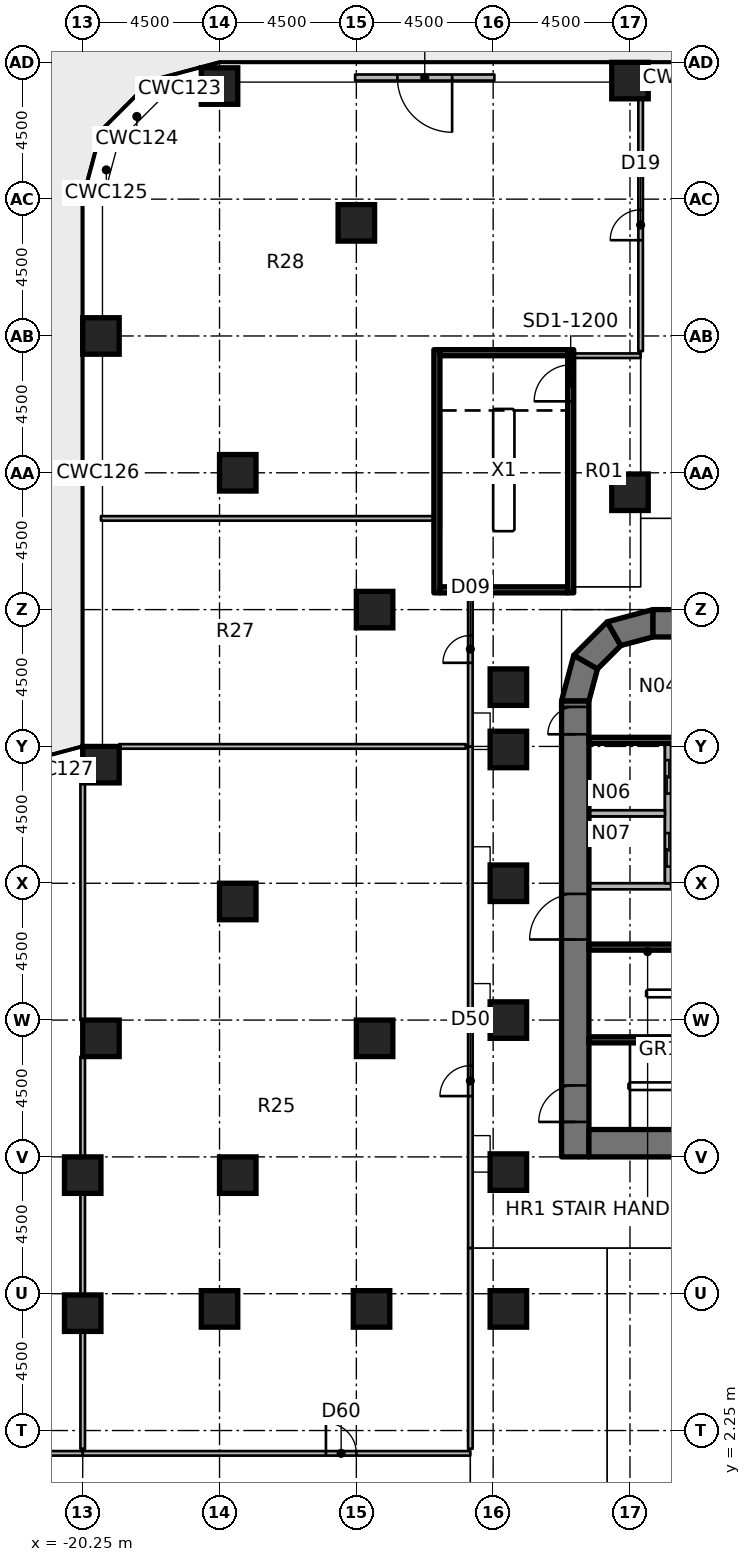
"""IFC4 building model, lengths in metres.
Left out: names, types, materials, properties, quantities, classifications, styles, units other than length and angle.
Written with IfcOpenShell. Run it as: python <this file> out.ifc"""

import sys

from ifc_helpers import new_model, si_unit, direction, frame, frame_2d, origin, origin_2d, place, context, subcontext, project, spatial, polyline, rectangle, outline, extrude, element, fill, save


model = new_model("IFC4")
c1 = context("Model", 3, precision=1e-05, world=origin(), true_north=direction((0.0, 1.0)))
c2 = subcontext(c1, "Body", "Model", "MODEL_VIEW")
j1 = project(units=[si_unit("LENGTHUNIT", "METRE"), si_unit("PLANEANGLEUNIT", "RADIAN")], contexts=[c1])
p1 = place(None, origin())
s1 = spatial("IfcSite", under=j1, at=p1, CompositionType="ELEMENT")
p2 = place(p1, origin())
s2 = spatial("IfcBuilding", under=s1, at=p2, CompositionType="ELEMENT")
p3 = place(p2, frame((0.0, 0.0, 12.0)))
s3 = spatial("IfcBuildingStorey", under=s2, at=p3, CompositionType="ELEMENT", Elevation=12.0)
for number, where, z_axis, x_axis in (
    (1, (-20.25, 6.11, 0.0), (0.0, 0.0, 1.0), (1.0, 0.0, 0.0)),
    (2, (-20.25, 10.65, 0.0), (0.0, 0.0, 1.0), (1.0, 0.0, 0.0)),
    (3, (-19.65, 15.15, 0.0), (0.0, 0.0, 1.0), (1.0, 0.0, 0.0)),
    (4, (-19.65, 24.15, 0.0), (0.0, 0.0, 1.0), (1.0, 0.0, 0.0)),
    (5, (-19.65, 38.25, 0.0), (0.0, 0.0, 1.0), (1.0, 0.0, 0.0)),
    (6, (-15.75, 6.25, 0.0), (0.0, 0.0, 1.0), (1.0, 0.0, 0.0)),
    (7, (-15.15, 10.65, 0.0), (0.0, 0.0, 1.0), (1.0, 0.0, 0.0)),
    (8, (-15.15, 19.65, 0.0), (0.0, 0.0, 1.0), (1.0, 0.0, 0.0)),
    (9, (-15.15, 33.75, 0.0), (0.0, 0.0, 1.0), (1.0, 0.0, 0.0)),
    (10, (-15.75, 46.47, 0.0), (0.0, 0.0, 1.0), (1.0, 0.0, 0.0)),
    (11, (-10.75, 6.25, 0.0), (0.0, 0.0, 1.0), (1.0, 0.0, 0.0)),
    (12, (-10.65, 15.15, 0.0), (0.0, 0.0, 1.0), (1.0, 0.0, 0.0)),
    (13, (-10.65, 29.25, 0.0), (0.0, 0.0, 1.0), (1.0, 0.0, 0.0)),
    (14, (-11.25, 41.97, 0.0), (0.0, 0.0, 1.0), (1.0, 0.0, 0.0)),
    (15, (-6.25, 6.25, 0.0), (0.0, 0.0, 1.0), (1.0, 0.0, 0.0)),
    (16, (-6.25, 10.75, 0.0), (0.0, 0.0, 1.0), (1.0, 0.0, 0.0)),
    (17, (-6.25, 15.75, 0.0), (0.0, 0.0, 1.0), (1.0, 0.0, 0.0)),
    (18, (-6.25, 20.25, 0.0), (0.0, 0.0, 1.0), (1.0, 0.0, 0.0)),
    (19, (-6.25, 24.65, 0.0), (0.0, 0.0, 1.0), (1.0, 0.0, 0.0)),
    (20, (-6.25, 26.7, 0.0), (0.0, 0.0, 1.0), (1.0, 0.0, 0.0)),
    (21, (-2.25, 33.11, 0.0), (0.0, 0.0, 1.0), (1.0, 0.0, 0.0)),
    (22, (-2.25, 46.65, 0.0), (0.0, 0.0, 1.0), (1.0, 0.0, 0.0)),
):
    element("IfcColumn", number, at=place(p3, frame(where, z_axis=z_axis, x_axis=x_axis)), inside=s3, PredefinedType="COLUMN", context=c2, shape_type="SweptSolid", body=[
        extrude(rectangle(XDim=1.2, YDim=1.2, at=origin_2d()), origin(), (0.0, 0.0, 1.0), 4.55),
    ])
p4 = place(p3, frame((-4.05, 11.25, 0.0), z_axis=(0.0, 0.0, 1.0), x_axis=(0.0, 1.0, 0.0)))
e23 = element("IfcWall", 23, at=p4, inside=s3, PredefinedType="SHEAR", context=c2, shape_type="SweptSolid", body=[
    extrude(rectangle(XDim=15.0, YDim=0.9, at=frame_2d((7.5, 0.0))), origin(), (0.0, 0.0, 1.0), 5.0),
])
p5 = place(p4, frame((7.15, 0.0, 0.0)))
e24 = element("IfcOpeningElement", 24, at=p5, cuts=e23, PredefinedType="OPENING", context=c2, shape_type="SweptSolid", body=[
    extrude(rectangle(XDim=1.5, YDim=2.3, at=frame_2d((0.75, 1.15))), frame((0.0, 0.46, 0.0), z_axis=(0.0, -1.0, 0.0), x_axis=(1.0, 0.0, 0.0)), (0.0, 0.0, 1.0), 0.92),
])
p6 = place(p4, frame((13.9, 0.0, 0.0)))
e25 = element("IfcOpeningElement", 25, at=p6, cuts=e23, PredefinedType="OPENING", context=c2, shape_type="SweptSolid", body=[
    extrude(rectangle(XDim=0.9, YDim=2.1, at=frame_2d((0.45, 1.05))), frame((0.0, 0.46, 0.0), z_axis=(0.0, -1.0, 0.0), x_axis=(1.0, 0.0, 0.0)), (0.0, 0.0, 1.0), 0.92),
])
p7 = place(p4, frame((1.15, 0.0, 0.0)))
e26 = element("IfcOpeningElement", 26, at=p7, cuts=e23, PredefinedType="OPENING", context=c2, shape_type="SweptSolid", body=[
    extrude(rectangle(XDim=1.2, YDim=2.1, at=frame_2d((0.6, 1.05))), frame((0.0, 0.46, 0.0), z_axis=(0.0, -1.0, 0.0), x_axis=(1.0, 0.0, 0.0)), (0.0, 0.0, 1.0), 0.92),
])
p8 = place(p3, frame((-3.6, 11.7, 0.0), z_axis=(0.0, 0.0, 1.0), x_axis=(1.0, 0.0, 0.0)))
e27 = element("IfcWall", 27, at=p8, inside=s3, PredefinedType="SHEAR", context=c2, shape_type="SweptSolid", body=[
    extrude(rectangle(XDim=7.2, YDim=0.9, at=frame_2d((3.6, 0.0))), origin(), (0.0, 0.0, 1.0), 5.0),
])
p9 = place(p3, frame((-1.5, 28.8, 0.0), z_axis=(0.0, 0.0, 1.0), x_axis=(1.0, 0.0, 0.0)))
e28 = element("IfcWall", 28, at=p9, inside=s3, PredefinedType="SHEAR", context=c2, shape_type="SweptSolid", body=[
    extrude(rectangle(XDim=3.0, YDim=0.9, at=frame_2d((1.5, 0.0))), origin(), (0.0, 0.0, 1.0), 5.0),
])
p10 = place(p3, origin())
e29 = element("IfcWall", 29, at=p10, inside=s3, PredefinedType="SHEAR", context=c2, shape_type="SweptSolid", body=[
    extrude(outline(polyline([(-4.5, 26.25), (-4.098, 27.75), (-3.319, 27.3), (-3.6, 26.25), (-4.5, 26.25)])), origin(), (0.0, 0.0, 1.0), 5.0),
])
p11 = place(p3, origin())
e30 = element("IfcWall", 30, at=p11, inside=s3, PredefinedType="SHEAR", context=c2, shape_type="SweptSolid", body=[
    extrude(outline(polyline([(-4.098, 27.75), (-3.0, 28.848), (-2.55, 28.069), (-3.319, 27.3), (-4.098, 27.75)])), origin(), (0.0, 0.0, 1.0), 5.0),
])
p12 = place(p3, origin())
e31 = element("IfcWall", 31, at=p12, inside=s3, PredefinedType="SHEAR", context=c2, shape_type="SweptSolid", body=[
    extrude(outline(polyline([(-3.0, 28.848), (-1.5, 29.25), (-1.5, 28.35), (-2.55, 28.069), (-3.0, 28.848)])), origin(), (0.0, 0.0, 1.0), 5.0),
])
p13 = place(p3, frame((-6.71, 46.75, 0.0), z_axis=(0.0, 0.0, 1.0), x_axis=(-1.0, 0.0, 0.0)))
e32 = element("IfcWall", 32, at=p13, inside=s3, PredefinedType="SOLIDWALL", context=c2, shape_type="SweptSolid", body=[
    extrude(rectangle(XDim=4.58, YDim=0.2, at=frame_2d((2.29, 0.0))), origin(), (0.0, 0.0, 1.0), 4.55),
])
p14 = place(p13, frame((1.39, 0.0, 0.0)))
e33 = element("IfcOpeningElement", 33, at=p14, cuts=e32, PredefinedType="OPENING", context=c2, shape_type="SweptSolid", body=[
    extrude(rectangle(XDim=1.8, YDim=2.4, at=frame_2d((0.9, 1.2))), frame((0.0, 0.11, 0.0), z_axis=(0.0, -1.0, 0.0), x_axis=(1.0, 0.0, 0.0)), (0.0, 0.0, 1.0), 0.22),
])
for number, where, z_axis, x_axis in (
    (34, (-3.6, 24.95, 0.0), (0.0, 0.0, 1.0), (1.0, 0.0, 0.0)),
    (35, (-3.6, 18.15, 0.0), (0.0, 0.0, 1.0), (1.0, 0.0, 0.0)),
    (36, (-3.6, 15.1, 0.0), (0.0, 0.0, 1.0), (1.0, 0.0, 0.0)),
):
    element("IfcWall", number, at=place(p3, frame(where, z_axis=z_axis, x_axis=x_axis)), inside=s3, PredefinedType="SHEAR", context=c2, shape_type="SweptSolid", body=[
        extrude(rectangle(XDim=7.2, YDim=0.2, at=frame_2d((3.6, 0.0))), origin(), (0.0, 0.0, 1.0), 4.55),
    ])
p15 = place(p3, frame((-3.6, 20.15, 0.0), z_axis=(0.0, 0.0, 1.0), x_axis=(1.0, 0.0, 0.0)))
e37 = element("IfcWall", 37, at=p15, inside=s3, PredefinedType="PARTITIONING", context=c2, shape_type="SweptSolid", body=[
    extrude(rectangle(XDim=2.7, YDim=0.2, at=frame_2d((1.35, 0.0))), origin(), (0.0, 0.0, 1.0), 4.55),
])
p16 = place(p3, frame((-1.0, 24.85, 0.0), z_axis=(0.0, 0.0, 1.0), x_axis=(0.0, -1.0, 0.0)))
e38 = element("IfcWall", 38, at=p16, inside=s3, PredefinedType="PARTITIONING", context=c2, shape_type="SweptSolid", body=[
    extrude(rectangle(XDim=4.6, YDim=0.2, at=frame_2d((2.3, 0.0))), origin(), (0.0, 0.0, 1.0), 4.55),
])
p17 = place(p16, frame((0.55, 0.0, 0.0)))
e39 = element("IfcOpeningElement", 39, at=p17, cuts=e38, PredefinedType="OPENING", context=c2, shape_type="SweptSolid", body=[
    extrude(rectangle(XDim=1.1, YDim=2.3, at=frame_2d((0.55, 1.15))), frame((0.0, 0.11, 0.0), z_axis=(0.0, -1.0, 0.0), x_axis=(1.0, 0.0, 0.0)), (0.0, 0.0, 1.0), 0.22),
])
p18 = place(p16, frame((2.95, 0.0, 0.0)))
e40 = element("IfcOpeningElement", 40, at=p18, cuts=e38, PredefinedType="OPENING", context=c2, shape_type="SweptSolid", body=[
    extrude(rectangle(XDim=1.1, YDim=2.3, at=frame_2d((0.55, 1.15))), frame((0.0, 0.11, 0.0), z_axis=(0.0, -1.0, 0.0), x_axis=(1.0, 0.0, 0.0)), (0.0, 0.0, 1.0), 0.22),
])
p19 = place(p3, frame((-3.6, 22.55, 0.0), z_axis=(0.0, 0.0, 1.0), x_axis=(1.0, 0.0, 0.0)))
e41 = element("IfcWall", 41, at=p19, inside=s3, PredefinedType="PARTITIONING", context=c2, shape_type="SweptSolid", body=[
    extrude(rectangle(XDim=2.5, YDim=0.2, at=frame_2d((1.25, 0.0))), origin(), (0.0, 0.0, 1.0), 4.55),
])
p20 = place(p3, frame((-8.6, 29.8, 0.0), z_axis=(0.0, 0.0, 1.0), x_axis=(0.0, 1.0, 0.0)))
e42 = element("IfcWall", 42, at=p20, inside=s3, PredefinedType="SHEAR", context=c2, shape_type="SweptSolid", body=[
    extrude(rectangle(XDim=8.0, YDim=0.2, at=frame_2d((4.0, 0.0))), origin(), (0.0, 0.0, 1.0), 4.55),
])
p21 = place(p3, frame((-4.2, 29.8, 0.0), z_axis=(0.0, 0.0, 1.0), x_axis=(0.0, 1.0, 0.0)))
e43 = element("IfcWall", 43, at=p21, inside=s3, PredefinedType="SHEAR", context=c2, shape_type="SweptSolid", body=[
    extrude(rectangle(XDim=8.0, YDim=0.2, at=frame_2d((4.0, 0.0))), origin(), (0.0, 0.0, 1.0), 4.55),
])
p22 = place(p21, frame((6.3, 0.0, 0.0)))
e44 = element("IfcOpeningElement", 44, at=p22, cuts=e43, PredefinedType="OPENING", context=c2, shape_type="SweptSolid", body=[
    extrude(rectangle(XDim=1.2, YDim=2.1, at=frame_2d((0.6, 1.05))), frame((0.0, 0.11, 0.0), z_axis=(0.0, -1.0, 0.0), x_axis=(1.0, 0.0, 0.0)), (0.0, 0.0, 1.0), 0.22),
])
for number, where, z_axis, x_axis in (
    (45, (-8.5, 29.9, 0.0), (0.0, 0.0, 1.0), (1.0, 0.0, 0.0)),
    (46, (-8.5, 37.7, 0.0), (0.0, 0.0, 1.0), (1.0, 0.0, 0.0)),
):
    element("IfcWall", number, at=place(p3, frame(where, z_axis=z_axis, x_axis=x_axis)), inside=s3, PredefinedType="SHEAR", context=c2, shape_type="SweptSolid", body=[
        extrude(rectangle(XDim=4.2, YDim=0.2, at=frame_2d((2.1, 0.0))), origin(), (0.0, 0.0, 1.0), 4.55),
    ])
p23 = place(p3, frame((-4.1, 37.6, 0.0), z_axis=(0.0, 0.0, 1.0), x_axis=(1.0, 0.0, 0.0)))
e47 = element("IfcWall", 47, at=p23, inside=s3, PredefinedType="PARTITIONING", context=c2, shape_type="SweptSolid", body=[
    extrude(rectangle(XDim=2.2, YDim=0.15, at=frame_2d((1.1, 0.0))), origin(), (0.0, 0.0, 1.0), 4.55),
])
p24 = place(p3, frame((-7.5, 8.25, 0.0), z_axis=(0.0, 0.0, 1.0), x_axis=(0.0, 1.0, 0.0)))
e48 = element("IfcWall", 48, at=p24, inside=s3, PredefinedType="PARTITIONING", context=c2, shape_type="SweptSolid", body=[
    extrude(rectangle(XDim=16.5, YDim=0.15, at=frame_2d((8.25, 0.0))), origin(), (0.0, 0.0, 1.0), 4.55),
])
p25 = place(p24, frame((5.0, 0.0, 0.0)))
e49 = element("IfcOpeningElement", 49, at=p25, cuts=e48, PredefinedType="OPENING", context=c2, shape_type="SweptSolid", body=[
    extrude(rectangle(XDim=1.0, YDim=2.1, at=frame_2d((0.5, 1.05))), frame((0.0, 0.085, 0.0), z_axis=(0.0, -1.0, 0.0), x_axis=(1.0, 0.0, 0.0)), (0.0, 0.0, 1.0), 0.17),
])
p26 = place(p3, frame((-7.5, 24.75, 0.0), z_axis=(0.0, 0.0, 1.0), x_axis=(0.0, 1.0, 0.0)))
e50 = element("IfcWall", 50, at=p26, inside=s3, PredefinedType="PARTITIONING", context=c2, shape_type="SweptSolid", body=[
    extrude(rectangle(XDim=5.25, YDim=0.15, at=frame_2d((2.625, 0.0))), origin(), (0.0, 0.0, 1.0), 4.55),
])
p27 = place(p26, frame((2.75, 0.0, 0.0)))
e51 = element("IfcOpeningElement", 51, at=p27, cuts=e50, PredefinedType="OPENING", context=c2, shape_type="SweptSolid", body=[
    extrude(rectangle(XDim=0.9, YDim=2.1, at=frame_2d((0.45, 1.05))), frame((0.0, 0.085, 0.0), z_axis=(0.0, -1.0, 0.0), x_axis=(1.0, 0.0, 0.0)), (0.0, 0.0, 1.0), 0.17),
])
p28 = place(p3, frame((-20.25, 1.5, 0.0), z_axis=(0.0, 0.0, 1.0), x_axis=(1.0, 0.0, 0.0)))
e52 = element("IfcWall", 52, at=p28, inside=s3, PredefinedType="PARTITIONING", context=c2, shape_type="SweptSolid", body=[
    extrude(rectangle(XDim=12.75, YDim=0.15, at=frame_2d((6.375, 0.0))), origin(), (0.0, 0.0, 1.0), 4.55),
])
p29 = place(p28, frame((8.0, 0.0, 0.0)))
e53 = element("IfcOpeningElement", 53, at=p29, cuts=e52, PredefinedType="OPENING", context=c2, shape_type="SweptSolid", body=[
    extrude(rectangle(XDim=1.0, YDim=2.1, at=frame_2d((0.5, 1.05))), frame((0.0, 0.085, 0.0), z_axis=(0.0, -1.0, 0.0), x_axis=(1.0, 0.0, 0.0)), (0.0, 0.0, 1.0), 0.17),
])
p30 = place(p3, frame((-46.65, 1.5, 0.0), z_axis=(0.0, 0.0, 1.0), x_axis=(1.0, 0.0, 0.0)))
e54 = element("IfcWall", 54, at=p30, inside=s3, PredefinedType="PARTITIONING", context=c2, shape_type="SweptSolid", body=[
    extrude(rectangle(XDim=26.4, YDim=0.15, at=frame_2d((13.2, 0.0))), origin(), (0.0, 0.0, 1.0), 4.55),
])
p31 = place(p30, frame((11.9, 0.0, 0.0)))
e55 = element("IfcOpeningElement", 55, at=p31, cuts=e54, PredefinedType="OPENING", context=c2, shape_type="SweptSolid", body=[
    extrude(rectangle(XDim=0.9, YDim=2.1, at=frame_2d((0.45, 1.05))), frame((0.0, 0.085, 0.0), z_axis=(0.0, -1.0, 0.0), x_axis=(1.0, 0.0, 0.0)), (0.0, 0.0, 1.0), 0.17),
])
p32 = place(p3, frame((-1.9, 37.75, 0.0), z_axis=(0.0, 0.0, 1.0), x_axis=(0.0, 1.0, 0.0)))
e56 = element("IfcWall", 56, at=p32, inside=s3, PredefinedType="PARTITIONING", context=c2, shape_type="SweptSolid", body=[
    extrude(rectangle(XDim=8.3, YDim=0.15, at=frame_2d((4.15, 0.0))), origin(), (0.0, 0.0, 1.0), 4.55),
])
p33 = place(p32, frame((3.65, 0.0, 0.0)))
e57 = element("IfcOpeningElement", 57, at=p33, cuts=e56, PredefinedType="OPENING", context=c2, shape_type="SweptSolid", body=[
    extrude(rectangle(XDim=1.0, YDim=2.1, at=frame_2d((0.5, 1.05))), frame((0.0, 0.085, 0.0), z_axis=(0.0, -1.0, 0.0), x_axis=(1.0, 0.0, 0.0)), (0.0, 0.0, 1.0), 0.17),
])
p34 = place(p3, frame((-20.25, 1.65, 0.0), z_axis=(0.0, 0.0, 1.0), x_axis=(0.0, 1.0, 0.0)))
e58 = element("IfcWall", 58, at=p34, inside=s3, PredefinedType="PARTITIONING", context=c2, shape_type="SweptSolid", body=[
    extrude(rectangle(XDim=3.86, YDim=0.15, at=frame_2d((1.93, 0.0))), origin(), (0.0, 0.0, 1.0), 4.55),
])
p35 = place(p3, frame((-20.25, 6.71, 0.0), z_axis=(0.0, 0.0, 1.0), x_axis=(0.0, 1.0, 0.0)))
e59 = element("IfcWall", 59, at=p35, inside=s3, PredefinedType="PARTITIONING", context=c2, shape_type="SweptSolid", body=[
    extrude(rectangle(XDim=3.34, YDim=0.15, at=frame_2d((1.67, 0.0))), origin(), (0.0, 0.0, 1.0), 4.55),
])
p36 = place(p3, frame((-20.25, 11.25, 0.0), z_axis=(0.0, 0.0, 1.0), x_axis=(0.0, 1.0, 0.0)))
e60 = element("IfcWall", 60, at=p36, inside=s3, PredefinedType="PARTITIONING", context=c2, shape_type="SweptSolid", body=[
    extrude(rectangle(XDim=3.3, YDim=0.15, at=frame_2d((1.65, 0.0))), origin(), (0.0, 0.0, 1.0), 4.55),
])
p37 = place(p3, frame((-20.25, 15.75, 0.0), z_axis=(0.0, 0.0, 1.0), x_axis=(0.0, 1.0, 0.0)))
e61 = element("IfcWall", 61, at=p37, inside=s3, PredefinedType="PARTITIONING", context=c2, shape_type="SweptSolid", body=[
    extrude(rectangle(XDim=7.8, YDim=0.15, at=frame_2d((3.9, 0.0))), origin(), (0.0, 0.0, 1.0), 4.55),
])
p38 = place(p3, frame((-19.05, 24.75, 0.0), z_axis=(0.0, 0.0, 1.0), x_axis=(1.0, 0.0, 0.0)))
e62 = element("IfcWall", 62, at=p38, inside=s3, PredefinedType="PARTITIONING", context=c2, shape_type="SweptSolid", body=[
    extrude(rectangle(XDim=11.4, YDim=0.15, at=frame_2d((5.7, 0.0))), origin(), (0.0, 0.0, 1.0), 4.55),
])
p39 = place(p3, frame((-7.5, 8.25, 0.0), z_axis=(0.0, 0.0, 1.0), x_axis=(0.0, -1.0, 0.0)))
e63 = element("IfcWall", 63, at=p39, inside=s3, PredefinedType="PARTITIONING", context=c2, shape_type="SweptSolid", body=[
    extrude(rectangle(XDim=6.6, YDim=0.15, at=frame_2d((3.3, 0.0))), origin(), (0.0, 0.0, 1.0), 4.55),
])
p40 = place(p3, frame((-19.65, 32.25, 0.0), z_axis=(0.0, 0.0, 1.0), x_axis=(1.0, 0.0, 0.0)))
e64 = element("IfcWall", 64, at=p40, inside=s3, PredefinedType="PARTITIONING", context=c2, shape_type="SweptSolid", body=[
    extrude(rectangle(XDim=10.95, YDim=0.15, at=frame_2d((5.475, 0.0))), origin(), (0.0, 0.0, 1.0), 4.55),
])
p41 = place(p14, origin())
e65 = element("IfcDoor", 65, at=p41, inside=s3, OperationType="SINGLE_SWING_LEFT", PredefinedType="DOOR", context=c2, shape_type="SweptSolid", body=[
    extrude(rectangle(XDim=1.8, YDim=2.4, at=frame_2d((0.9, 1.2))), frame((0.0, 0.025, 0.0), z_axis=(0.0, -1.0, 0.0), x_axis=(1.0, 0.0, 0.0)), (0.0, 0.0, 1.0), 0.05),
])
fill(e33, e65)
p42 = place(p5, origin())
e66 = element("IfcDoor", 66, at=p42, inside=s3, OperationType="DOUBLE_DOOR_SINGLE_SWING", PredefinedType="DOOR", context=c2, shape_type="SweptSolid", body=[
    extrude(rectangle(XDim=1.5, YDim=2.3, at=frame_2d((0.75, 1.15))), frame((0.0, 0.025, 0.0), z_axis=(0.0, -1.0, 0.0), x_axis=(1.0, 0.0, 0.0)), (0.0, 0.0, 1.0), 0.05),
])
fill(e24, e66)
p43 = place(p6, origin())
e67 = element("IfcDoor", 67, at=p43, inside=s3, OperationType="SINGLE_SWING_RIGHT", PredefinedType="DOOR", context=c2, shape_type="SweptSolid", body=[
    extrude(rectangle(XDim=0.9, YDim=2.1, at=frame_2d((0.45, 1.05))), frame((0.0, 0.025, 0.0), z_axis=(0.0, -1.0, 0.0), x_axis=(1.0, 0.0, 0.0)), (0.0, 0.0, 1.0), 0.05),
])
fill(e25, e67)
p44 = place(p7, origin())
e68 = element("IfcDoor", 68, at=p44, inside=s3, OperationType="SINGLE_SWING_RIGHT", PredefinedType="DOOR", context=c2, shape_type="SweptSolid", body=[
    extrude(rectangle(XDim=1.2, YDim=2.1, at=frame_2d((0.6, 1.05))), frame((0.0, 0.025, 0.0), z_axis=(0.0, -1.0, 0.0), x_axis=(1.0, 0.0, 0.0)), (0.0, 0.0, 1.0), 0.05),
])
fill(e26, e68)
p45 = place(p17, origin())
e69 = element("IfcDoor", 69, at=p45, inside=s3, OperationType="DOUBLE_DOOR_SLIDING", PredefinedType="DOOR", context=c2, shape_type="SweptSolid", body=[
    extrude(rectangle(XDim=1.1, YDim=2.3, at=frame_2d((0.55, 1.15))), frame((0.0, 0.025, 0.0), z_axis=(0.0, -1.0, 0.0), x_axis=(1.0, 0.0, 0.0)), (0.0, 0.0, 1.0), 0.05),
])
fill(e39, e69)
p46 = place(p18, origin())
e70 = element("IfcDoor", 70, at=p46, inside=s3, OperationType="DOUBLE_DOOR_SLIDING", PredefinedType="DOOR", context=c2, shape_type="SweptSolid", body=[
    extrude(rectangle(XDim=1.1, YDim=2.3, at=frame_2d((0.55, 1.15))), frame((0.0, 0.025, 0.0), z_axis=(0.0, -1.0, 0.0), x_axis=(1.0, 0.0, 0.0)), (0.0, 0.0, 1.0), 0.05),
])
fill(e40, e70)
p47 = place(p22, origin())
e71 = element("IfcDoor", 71, at=p47, inside=s3, OperationType="SINGLE_SWING_RIGHT", PredefinedType="DOOR", context=c2, shape_type="SweptSolid", body=[
    extrude(rectangle(XDim=1.2, YDim=2.1, at=frame_2d((0.6, 1.05))), frame((0.0, 0.025, 0.0), z_axis=(0.0, -1.0, 0.0), x_axis=(1.0, 0.0, 0.0)), (0.0, 0.0, 1.0), 0.05),
])
fill(e44, e71)
p48 = place(p25, origin())
e72 = element("IfcDoor", 72, at=p48, inside=s3, OperationType="SINGLE_SWING_LEFT", PredefinedType="DOOR", context=c2, shape_type="SweptSolid", body=[
    extrude(rectangle(XDim=1.0, YDim=2.1, at=frame_2d((0.5, 1.05))), frame((0.0, 0.025, 0.0), z_axis=(0.0, -1.0, 0.0), x_axis=(1.0, 0.0, 0.0)), (0.0, 0.0, 1.0), 0.05),
])
fill(e49, e72)
p49 = place(p27, origin())
e73 = element("IfcDoor", 73, at=p49, inside=s3, OperationType="SINGLE_SWING_LEFT", PredefinedType="DOOR", context=c2, shape_type="SweptSolid", body=[
    extrude(rectangle(XDim=0.9, YDim=2.1, at=frame_2d((0.45, 1.05))), frame((0.0, 0.025, 0.0), z_axis=(0.0, -1.0, 0.0), x_axis=(1.0, 0.0, 0.0)), (0.0, 0.0, 1.0), 0.05),
])
fill(e51, e73)
p50 = place(p29, origin())
e74 = element("IfcDoor", 74, at=p50, inside=s3, OperationType="SINGLE_SWING_LEFT", PredefinedType="DOOR", context=c2, shape_type="SweptSolid", body=[
    extrude(rectangle(XDim=1.0, YDim=2.1, at=frame_2d((0.5, 1.05))), frame((0.0, 0.025, 0.0), z_axis=(0.0, -1.0, 0.0), x_axis=(1.0, 0.0, 0.0)), (0.0, 0.0, 1.0), 0.05),
])
fill(e53, e74)
p51 = place(p33, origin())
e75 = element("IfcDoor", 75, at=p51, inside=s3, OperationType="SINGLE_SWING_LEFT", PredefinedType="DOOR", context=c2, shape_type="SweptSolid", body=[
    extrude(rectangle(XDim=1.0, YDim=2.1, at=frame_2d((0.5, 1.05))), frame((0.0, 0.025, 0.0), z_axis=(0.0, -1.0, 0.0), x_axis=(1.0, 0.0, 0.0)), (0.0, 0.0, 1.0), 0.05),
])
fill(e57, e75)
save(model, sys.argv[1])
